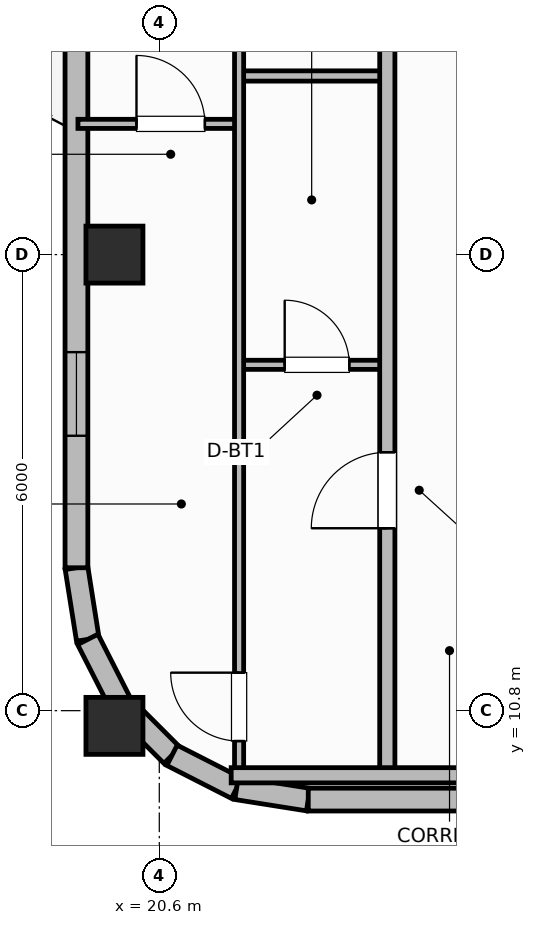
"""IFC4 building model, lengths in metres.
Left out: names, types, materials, properties, quantities, classifications, styles, units other than length and angle.
Written with IfcOpenShell. Run it as: python <this file> out.ifc"""

import sys

from ifc_helpers import new_model, si_unit, direction, frame, frame_2d, origin, origin_2d, place, context, subcontext, project, spatial, rectangle, extrude, element, fill, save


model = new_model("IFC4")
c1 = context("Model", 3, precision=1e-05, world=origin(), true_north=direction((0.0, 1.0)))
c2 = subcontext(c1, "Body", "Model", "MODEL_VIEW")
j1 = project(units=[si_unit("LENGTHUNIT", "METRE"), si_unit("PLANEANGLEUNIT", "RADIAN")], contexts=[c1])
p1 = place(None, origin())
s1 = spatial("IfcSite", under=j1, at=p1, CompositionType="ELEMENT")
p2 = place(p1, origin())
s2 = spatial("IfcBuilding", under=s1, at=p2, CompositionType="ELEMENT")
p3 = place(p2, frame((0.0, 0.0, 289.8)))
s3 = spatial("IfcBuildingStorey", under=s2, at=p3, CompositionType="ELEMENT", Elevation=289.8)
for number, where, z_axis, x_axis in (
    (1, (20.01, 10.6, 0.0), (0.0, 0.0, 1.0), (1.0, 0.0, 0.0)),
    (2, (20.01, 16.8, 0.0), (0.0, 0.0, 1.0), (1.0, 0.0, 0.0)),
):
    element("IfcColumn", number, at=place(p3, frame(where, z_axis=z_axis, x_axis=x_axis)), inside=s3, PredefinedType="COLUMN", context=c2, shape_type="SweptSolid", body=[
        extrude(rectangle(XDim=0.75, YDim=0.75, at=origin_2d()), origin(), (0.0, 0.0, 1.0), 3.7),
    ])
p4 = place(p3, frame((19.51, 12.68, 0.0), z_axis=(0.0, 0.0, 1.0), x_axis=(0.156343617883, -0.987702725088, 0.0)))
e3 = element("IfcWall", 3, at=p4, inside=s3, PredefinedType="SOLIDWALL", context=c2, shape_type="SweptSolid", body=[
    extrude(rectangle(XDim=0.954, YDim=0.3, at=frame_2d((0.477, 0.0))), origin(), (0.0, 0.0, 1.0), 2.73),
])
for number, where, z_axis, x_axis in (
    (4, (19.659, 11.738, 0.0), (0.0, 0.0, 1.0), (0.454, -0.891, 0.0)),
    (5, (20.093, 10.887, 0.0), (0.0, 0.0, 1.0), (0.707, -0.707, 0.0)),
):
    element("IfcWall", number, at=place(p3, frame(where, z_axis=z_axis, x_axis=x_axis)), inside=s3, PredefinedType="SOLIDWALL", context=c2, shape_type="SweptSolid", body=[
        extrude(rectangle(XDim=0.954, YDim=0.3, at=frame_2d((0.477, 0.0))), origin(), (0.0, 0.0, 1.0), 2.73),
    ])
p5 = place(p3, frame((20.767, 10.212, 0.0), z_axis=(0.0, 0.0, 1.0), x_axis=(0.891023873617, -0.45395644796, 0.0)))
e6 = element("IfcWall", 6, at=p5, inside=s3, PredefinedType="SOLIDWALL", context=c2, shape_type="SweptSolid", body=[
    extrude(rectangle(XDim=0.954, YDim=0.3, at=frame_2d((0.477, 0.0))), origin(), (0.0, 0.0, 1.0), 2.73),
])
p6 = place(p3, frame((21.617, 9.779, 0.0), z_axis=(0.0, 0.0, 1.0), x_axis=(0.987669453596, -0.156553666304, 0.0)))
e7 = element("IfcWall", 7, at=p6, inside=s3, PredefinedType="SOLIDWALL", context=c2, shape_type="SweptSolid", body=[
    extrude(rectangle(XDim=0.954, YDim=0.3, at=frame_2d((0.477, 0.0))), origin(), (0.0, 0.0, 1.0), 2.73),
])
p7 = place(p3, frame((22.56, 9.63, 0.0), z_axis=(0.0, 0.0, 1.0), x_axis=(1.0, 0.0, 0.0)))
e8 = element("IfcWall", 8, at=p7, inside=s3, PredefinedType="SOLIDWALL", context=c2, shape_type="SweptSolid", body=[
    extrude(rectangle(XDim=4.45, YDim=0.3, at=frame_2d((2.225, 0.0))), origin(), (0.0, 0.0, 1.0), 2.73),
])
p8 = place(p3, frame((19.51, 23.8, 0.0), z_axis=(0.0, 0.0, 1.0), x_axis=(0.0, -1.0, 0.0)))
e9 = element("IfcWall", 9, at=p8, inside=s3, PredefinedType="SOLIDWALL", context=c2, shape_type="SweptSolid", body=[
    extrude(rectangle(XDim=11.12, YDim=0.3, at=frame_2d((5.56, 0.0))), origin(), (0.0, 0.0, 1.0), 2.73),
])
p9 = place(p8, frame((2.1, 0.0, 0.0)))
e10 = element("IfcOpeningElement", 10, at=p9, cuts=e9, PredefinedType="OPENING", context=c2, shape_type="SweptSolid", body=[
    extrude(rectangle(XDim=1.6, YDim=2.1, at=frame_2d((0.8, 1.05))), frame((0.0, 0.16, 0.0), z_axis=(0.0, -1.0, 0.0), x_axis=(1.0, 0.0, 0.0)), (0.0, 0.0, 1.0), 0.32),
])
p10 = place(p8, frame((8.283, 0.0, 0.95)))
e11 = element("IfcOpeningElement", 11, at=p10, cuts=e9, PredefinedType="OPENING", context=c2, shape_type="SweptSolid", body=[
    extrude(rectangle(XDim=1.1, YDim=1.65, at=frame_2d((0.55, 0.825))), frame((0.0, 0.16, 0.0), z_axis=(0.0, -1.0, 0.0), x_axis=(1.0, 0.0, 0.0)), (0.0, 0.0, 1.0), 0.32),
])
p11 = place(p3, frame((21.65, 15.35, 0.0), z_axis=(0.0, 0.0, 1.0), x_axis=(1.0, 0.0, 0.0)))
e12 = element("IfcWall", 12, at=p11, inside=s3, PredefinedType="PARTITIONING", context=c2, shape_type="SweptSolid", body=[
    extrude(rectangle(XDim=1.95, YDim=0.12, at=frame_2d((0.975, 0.0))), origin(), (0.0, 0.0, 1.0), 2.56),
])
p12 = place(p11, frame((0.6, 0.0, 0.0)))
e13 = element("IfcOpeningElement", 13, at=p12, cuts=e12, PredefinedType="OPENING", context=c2, shape_type="SweptSolid", body=[
    extrude(rectangle(XDim=0.85, YDim=2.1, at=frame_2d((0.425, 1.05))), frame((0.0, 0.07, 0.0), z_axis=(0.0, -1.0, 0.0), x_axis=(1.0, 0.0, 0.0)), (0.0, 0.0, 1.0), 0.14),
])
p13 = place(p3, frame((21.65, 19.15, 0.0), z_axis=(0.0, 0.0, 1.0), x_axis=(1.0, 0.0, 0.0)))
e14 = element("IfcWall", 14, at=p13, inside=s3, PredefinedType="PARTITIONING", context=c2, shape_type="SweptSolid", body=[
    extrude(rectangle(XDim=1.95, YDim=0.135, at=frame_2d((0.975, 0.0))), origin(), (0.0, 0.0, 1.0), 2.56),
])
p14 = place(p3, frame((19.53, 18.52, 0.0), z_axis=(0.0, 0.0, 1.0), x_axis=(1.0, 0.0, 0.0)))
e15 = element("IfcWall", 15, at=p14, inside=s3, PredefinedType="PARTITIONING", context=c2, shape_type="SweptSolid", body=[
    extrude(rectangle(XDim=2.12, YDim=0.12, at=frame_2d((1.06, 0.0))), origin(), (0.0, 0.0, 1.0), 2.56),
])
p15 = place(p14, frame((0.77, 0.0, 0.0)))
e16 = element("IfcOpeningElement", 16, at=p15, cuts=e15, PredefinedType="OPENING", context=c2, shape_type="SweptSolid", body=[
    extrude(rectangle(XDim=0.9, YDim=2.1, at=frame_2d((0.45, 1.05))), frame((0.0, 0.07, 0.0), z_axis=(0.0, -1.0, 0.0), x_axis=(1.0, 0.0, 0.0)), (0.0, 0.0, 1.0), 0.14),
])
p16 = place(p3, frame((21.65, 9.99, 0.0), z_axis=(0.0, 0.0, 1.0), x_axis=(0.0, 1.0, 0.0)))
e17 = element("IfcWall", 17, at=p16, inside=s3, PredefinedType="PARTITIONING", context=c2, shape_type="SweptSolid", body=[
    extrude(rectangle(XDim=22.72, YDim=0.12, at=frame_2d((11.36, 0.0))), origin(), (0.0, 0.0, 1.0), 2.56),
])
p17 = place(p16, frame((0.41, 0.0, 0.0)))
e18 = element("IfcOpeningElement", 18, at=p17, cuts=e17, PredefinedType="OPENING", context=c2, shape_type="SweptSolid", body=[
    extrude(rectangle(XDim=0.9, YDim=2.1, at=frame_2d((0.45, 1.05))), frame((0.0, 0.07, 0.0), z_axis=(0.0, -1.0, 0.0), x_axis=(1.0, 0.0, 0.0)), (0.0, 0.0, 1.0), 0.14),
])
p18 = place(p16, frame((15.535, 0.0, 0.0)))
e19 = element("IfcOpeningElement", 19, at=p18, cuts=e17, PredefinedType="OPENING", context=c2, shape_type="SweptSolid", body=[
    extrude(rectangle(XDim=0.82, YDim=2.08, at=frame_2d((0.41, 1.04))), frame((0.0, 0.07, 0.0), z_axis=(0.0, -1.0, 0.0), x_axis=(1.0, 0.0, 0.0)), (0.0, 0.0, 1.0), 0.14),
])
p19 = place(p3, frame((23.6, 9.95, 0.0), z_axis=(0.0, 0.0, 1.0), x_axis=(0.0, 1.0, 0.0)))
e20 = element("IfcWall", 20, at=p19, inside=s3, PredefinedType="PARTITIONING", context=c2, shape_type="SweptSolid", body=[
    extrude(rectangle(XDim=36.5, YDim=0.2, at=frame_2d((18.25, 0.0))), origin(), (0.0, 0.0, 1.0), 2.56),
])
p20 = place(p19, frame((3.25, 0.0, 0.0)))
e21 = element("IfcOpeningElement", 21, at=p20, cuts=e20, PredefinedType="OPENING", context=c2, shape_type="SweptSolid", body=[
    extrude(rectangle(XDim=1.0, YDim=2.15, at=frame_2d((0.5, 1.075))), frame((0.0, 0.11, 0.0), z_axis=(0.0, -1.0, 0.0), x_axis=(1.0, 0.0, 0.0)), (0.0, 0.0, 1.0), 0.22),
])
p21 = place(p19, frame((23.5, 0.0, 0.0)))
e22 = element("IfcOpeningElement", 22, at=p21, cuts=e20, PredefinedType="OPENING", context=c2, shape_type="SweptSolid", body=[
    extrude(rectangle(XDim=1.0, YDim=2.15, at=frame_2d((0.5, 1.075))), frame((0.0, 0.11, 0.0), z_axis=(0.0, -1.0, 0.0), x_axis=(1.0, 0.0, 0.0)), (0.0, 0.0, 1.0), 0.22),
])
p22 = place(p3, frame((21.546, 9.95, 0.0), z_axis=(0.0, 0.0, 1.0), x_axis=(1.0, 0.0, 0.0)))
e23 = element("IfcWall", 23, at=p22, inside=s3, PredefinedType="PARTITIONING", context=c2, shape_type="SweptSolid", body=[
    extrude(rectangle(XDim=3.754, YDim=0.2, at=frame_2d((1.877, 0.0))), origin(), (0.0, 0.0, 1.0), 2.56),
])
p23 = place(p10, origin())
e24 = element("IfcWindow", 24, at=p23, inside=s3, PartitioningType="SINGLE_PANEL", PredefinedType="WINDOW", context=c2, shape_type="SweptSolid", body=[
    extrude(rectangle(XDim=1.1, YDim=1.65, at=frame_2d((0.55, 0.825))), frame((0.0, 0.03, 0.0), z_axis=(0.0, -1.0, 0.0), x_axis=(1.0, 0.0, 0.0)), (0.0, 0.0, 1.0), 0.06),
])
fill(e11, e24)
p24 = place(p12, origin())
e25 = element("IfcDoor", 25, at=p24, inside=s3, OperationType="SINGLE_SWING_LEFT", PredefinedType="DOOR", context=c2, shape_type="SweptSolid", body=[
    extrude(rectangle(XDim=0.85, YDim=2.1, at=frame_2d((0.425, 1.05))), frame((0.0, 0.025, 0.0), z_axis=(0.0, -1.0, 0.0), x_axis=(1.0, 0.0, 0.0)), (0.0, 0.0, 1.0), 0.05),
])
fill(e13, e25)
p25 = place(p15, origin())
e26 = element("IfcDoor", 26, at=p25, inside=s3, OperationType="SINGLE_SWING_LEFT", PredefinedType="DOOR", context=c2, shape_type="SweptSolid", body=[
    extrude(rectangle(XDim=0.9, YDim=2.1, at=frame_2d((0.45, 1.05))), frame((0.0, 0.025, 0.0), z_axis=(0.0, -1.0, 0.0), x_axis=(1.0, 0.0, 0.0)), (0.0, 0.0, 1.0), 0.05),
])
fill(e16, e26)
p26 = place(p17, origin())
e27 = element("IfcDoor", 27, at=p26, inside=s3, OperationType="SINGLE_SWING_RIGHT", PredefinedType="DOOR", context=c2, shape_type="SweptSolid", body=[
    extrude(rectangle(XDim=0.9, YDim=2.1, at=frame_2d((0.45, 1.05))), frame((0.0, 0.025, 0.0), z_axis=(0.0, -1.0, 0.0), x_axis=(1.0, 0.0, 0.0)), (0.0, 0.0, 1.0), 0.05),
])
fill(e18, e27)
p27 = place(p20, origin())
e28 = element("IfcDoor", 28, at=p27, inside=s3, OperationType="SINGLE_SWING_LEFT", PredefinedType="DOOR", context=c2, shape_type="SweptSolid", body=[
    extrude(rectangle(XDim=1.0, YDim=2.15, at=frame_2d((0.5, 1.075))), frame((0.0, 0.025, 0.0), z_axis=(0.0, -1.0, 0.0), x_axis=(1.0, 0.0, 0.0)), (0.0, 0.0, 1.0), 0.05),
])
fill(e21, e28)
save(model, sys.argv[1])
